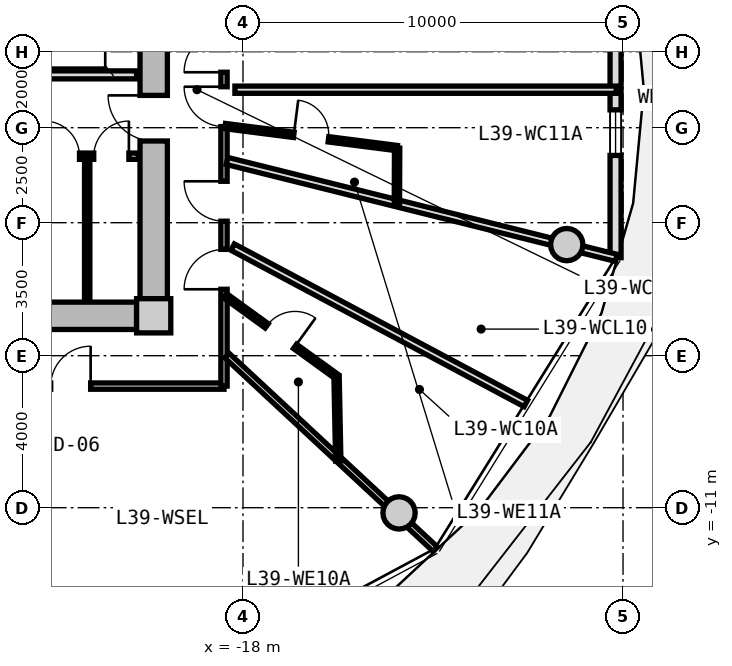
"""IFC4 building model, lengths in metres.
Left out: names, types, materials, properties, quantities, classifications, styles, units other than length and angle.
Written with IfcOpenShell. Run it as: python <this file> out.ifc"""

import sys

from ifc_helpers import new_model, si_unit, direction, frame, frame_2d, origin, origin_2d, place, context, subcontext, project, spatial, rectangle, circle, extrude, source, transform, mapped, element, fill, save


model = new_model("IFC4")
c1 = context("Model", 3, precision=1e-05, world=origin(), true_north=direction((0.0, 1.0)))
c2 = subcontext(c1, "Body", "Model", "MODEL_VIEW")
j1 = project(units=[si_unit("LENGTHUNIT", "METRE"), si_unit("PLANEANGLEUNIT", "RADIAN")], contexts=[c1])
p1 = place(None, origin())
s1 = spatial("IfcSite", under=j1, at=p1, CompositionType="ELEMENT")
p2 = place(p1, origin())
s2 = spatial("IfcBuilding", under=s1, at=p2, CompositionType="ELEMENT")
p3 = place(p2, frame((0.0, 0.0, 126.75)))
s3 = spatial("IfcBuildingStorey", under=s2, at=p3, CompositionType="ELEMENT", Elevation=126.75)
m1 = source(origin(), c2, "Body", "SweptSolid", [
    extrude(rectangle(XDim=0.9, YDim=0.9, at=origin_2d()), origin(), (0.0, 0.0, 1.0), 3.05),
])
p4 = place(p3, frame((-20.35, -5.95, 0.0), z_axis=(0.0, 0.0, 1.0), x_axis=(1.0, 0.0, 0.0)))
e1 = element("IfcColumn", 1, at=p4, inside=s3, PredefinedType="COLUMN", context=c2, shape_type="MappedRepresentation", body=[
    mapped(m1, transform((0.0, 0.0, 0.0), x_axis=(1.0, 0.0, 0.0), y_axis=(0.0, 1.0, 0.0), z_axis=(0.0, 0.0, 1.0), scale=1.0)),
])
m2 = source(origin(), c2, "Body", "SweptSolid", [
    extrude(rectangle(XDim=14.4, YDim=0.72, at=frame_2d((7.2, 0.0))), origin(), (0.0, 0.0, 1.0), 2.73),
])
p5 = place(p3, frame((-20.8, -5.95, 0.0), z_axis=(0.0, 0.0, 1.0), x_axis=(-1.0, 0.0, 0.0)))
e2 = element("IfcWall", 2, at=p5, inside=s3, PredefinedType="SHEAR", context=c2, shape_type="MappedRepresentation", body=[
    mapped(m2, transform((0.0, 0.0, 0.0), x_axis=(1.0, 0.0, 0.0), y_axis=(0.0, 1.0, 0.0), z_axis=(0.0, 0.0, 1.0), scale=1.0)),
])
m3 = source(origin(), c2, "Body", "SweptSolid", [
    extrude(rectangle(XDim=11.0, YDim=0.72, at=frame_2d((5.5, 0.0))), origin(), (0.0, 0.0, 1.0), 2.73),
])
p6 = place(p3, frame((-20.35, 5.5, 0.0), z_axis=(0.0, 0.0, 1.0), x_axis=(0.0, -1.0, 0.0)))
e3 = element("IfcWall", 3, at=p6, inside=s3, PredefinedType="SHEAR", context=c2, shape_type="MappedRepresentation", body=[
    mapped(m3, transform((0.0, 0.0, 0.0), x_axis=(1.0, 0.0, 0.0), y_axis=(0.0, 1.0, 0.0), z_axis=(0.0, 0.0, 1.0), scale=1.0)),
])
p7 = place(p6, frame((5.65, 0.0, 0.0)))
e4 = element("IfcOpeningElement", 4, at=p7, cuts=e3, PredefinedType="OPENING", context=c2, shape_type="SweptSolid", body=[
    extrude(rectangle(XDim=1.2, YDim=2.15, at=frame_2d((0.6, 1.075))), frame((0.0, 0.37, 0.0), z_axis=(0.0, -1.0, 0.0), x_axis=(1.0, 0.0, 0.0)), (0.0, 0.0, 1.0), 0.74),
])
m4 = source(origin(), c2, "Body", "SweptSolid", [
    extrude(circle(Radius=0.425, at=origin_2d()), origin(), (0.0, 0.0, 1.0), 3.05),
])
for number, where, z_axis, x_axis in (
    (5, (-13.894, -11.137, 0.0), (0.0, 0.0, 1.0), (1.0, 0.0, 0.0)),
    (6, (-9.481, -4.076, 0.0), (0.0, 0.0, 1.0), (1.0, 0.0, 0.0)),
):
    element("IfcColumn", number, at=place(p3, frame(where, z_axis=z_axis, x_axis=x_axis)), inside=s3, PredefinedType="COLUMN", context=c2, shape_type="MappedRepresentation", body=[
        mapped(m4, transform((0.0, 0.0, 0.0), x_axis=(1.0, 0.0, 0.0), y_axis=(0.0, 1.0, 0.0), z_axis=(0.0, 0.0, 1.0), scale=1.0)),
    ])
m5 = source(origin(), c2, "Body", "SweptSolid", [
    extrude(rectangle(XDim=8.841, YDim=0.29, at=frame_2d((4.421, 0.0))), origin(), (0.0, 0.0, 1.0), 2.73),
])
p8 = place(p3, frame((-8.196, 4.421, 0.0), z_axis=(0.0, 0.0, 1.0), x_axis=(0.0, -1.0, 0.0)))
e7 = element("IfcWall", 7, at=p8, inside=s3, PredefinedType="SOLIDWALL", context=c2, shape_type="MappedRepresentation", body=[
    mapped(m5, transform((0.0, 0.0, 0.0), x_axis=(1.0, 0.0, 0.0), y_axis=(0.0, 1.0, 0.0), z_axis=(0.0, 0.0, 1.0), scale=1.0)),
])
p9 = place(p8, frame((0.98, 0.0, 0.0)))
e8 = element("IfcOpeningElement", 8, at=p9, cuts=e7, PredefinedType="OPENING", context=c2, shape_type="SweptSolid", body=[
    extrude(rectangle(XDim=1.15, YDim=2.25, at=frame_2d((0.575, 1.125))), frame((0.0, 0.155, 0.0), z_axis=(0.0, -1.0, 0.0), x_axis=(1.0, 0.0, 0.0)), (0.0, 0.0, 1.0), 0.31),
])
p10 = place(p8, frame((4.951, 0.0, 0.85)))
e9 = element("IfcOpeningElement", 9, at=p10, cuts=e7, PredefinedType="OPENING", context=c2, shape_type="SweptSolid", body=[
    extrude(rectangle(XDim=1.2, YDim=1.5, at=frame_2d((0.6, 0.75))), frame((0.0, 0.155, 0.0), z_axis=(0.0, -1.0, 0.0), x_axis=(1.0, 0.0, 0.0)), (0.0, 0.0, 1.0), 0.31),
])
m6 = source(origin(), c2, "Body", "SweptSolid", [
    extrude(rectangle(XDim=6.66, YDim=0.21, at=frame_2d((3.33, 0.0))), origin(), (0.0, 0.0, 1.0), 2.715),
])
p11 = place(p3, frame((-27.46, 0.39, 0.0), z_axis=(0.0, 0.0, 1.0), x_axis=(1.0, 0.0, 0.0)))
e10 = element("IfcWall", 10, at=p11, inside=s3, PredefinedType="PARTITIONING", context=c2, shape_type="MappedRepresentation", body=[
    mapped(m6, transform((0.0, 0.0, 0.0), x_axis=(1.0, 0.0, 0.0), y_axis=(0.0, 1.0, 0.0), z_axis=(0.0, 0.0, 1.0), scale=1.0)),
])
p12 = place(p11, frame((1.0, 0.0, 0.0)))
e11 = element("IfcOpeningElement", 11, at=p12, cuts=e10, PredefinedType="OPENING", context=c2, shape_type="SweptSolid", body=[
    extrude(rectangle(XDim=1.2, YDim=2.15, at=frame_2d((0.6, 1.075))), frame((0.0, 0.115, 0.0), z_axis=(0.0, -1.0, 0.0), x_axis=(1.0, 0.0, 0.0)), (0.0, 0.0, 1.0), 0.23),
])
m7 = source(origin(), c2, "Body", "SweptSolid", [
    extrude(rectangle(XDim=2.7, YDim=0.165, at=frame_2d((1.35, 0.0))), origin(), (0.0, 0.0, 1.0), 2.715),
])
p13 = place(p3, frame((-23.45, -1.75, 0.0), z_axis=(0.0, 0.0, 1.0), x_axis=(1.0, 0.0, 0.0)))
e12 = element("IfcWall", 12, at=p13, inside=s3, PredefinedType="PARTITIONING", context=c2, shape_type="MappedRepresentation", body=[
    mapped(m7, transform((0.0, 0.0, 0.0), x_axis=(1.0, 0.0, 0.0), y_axis=(0.0, 1.0, 0.0), z_axis=(0.0, 0.0, 1.0), scale=1.0)),
])
p14 = place(p13, frame((0.222, 0.0, 0.0)))
e13 = element("IfcOpeningElement", 13, at=p14, cuts=e12, PredefinedType="OPENING", context=c2, shape_type="SweptSolid", body=[
    extrude(rectangle(XDim=0.925, YDim=2.1, at=frame_2d((0.462, 1.05))), frame((0.0, 0.093, 0.0), z_axis=(0.0, -1.0, 0.0), x_axis=(1.0, 0.0, 0.0)), (0.0, 0.0, 1.0), 0.185),
])
p15 = place(p13, frame((1.522, 0.0, 0.0)))
e14 = element("IfcOpeningElement", 14, at=p15, cuts=e12, PredefinedType="OPENING", context=c2, shape_type="SweptSolid", body=[
    extrude(rectangle(XDim=0.925, YDim=2.1, at=frame_2d((0.462, 1.05))), frame((0.0, 0.093, 0.0), z_axis=(0.0, -1.0, 0.0), x_axis=(1.0, 0.0, 0.0)), (0.0, 0.0, 1.0), 0.185),
])
m8 = source(origin(), c2, "Body", "SweptSolid", [
    extrude(rectangle(XDim=3.8, YDim=0.14, at=frame_2d((1.9, 0.0))), origin(), (0.0, 0.0, 1.0), 2.715),
])
p16 = place(p3, frame((-22.1, -5.55, 0.0), z_axis=(0.0, 0.0, 1.0), x_axis=(0.0, 1.0, 0.0)))
e15 = element("IfcWall", 15, at=p16, inside=s3, PredefinedType="PARTITIONING", context=c2, shape_type="MappedRepresentation", body=[
    mapped(m8, transform((0.0, 0.0, 0.0), x_axis=(1.0, 0.0, 0.0), y_axis=(0.0, 1.0, 0.0), z_axis=(0.0, 0.0, 1.0), scale=1.0)),
])
m9 = source(origin(), c2, "Body", "SweptSolid", [
    extrude(rectangle(XDim=8.6, YDim=0.165, at=frame_2d((4.3, 0.0))), origin(), (0.0, 0.0, 1.0), 2.715),
])
p17 = place(p3, frame((-18.5, -7.8, 0.0), z_axis=(0.0, 0.0, 1.0), x_axis=(-1.0, 0.0, 0.0)))
e16 = element("IfcWall", 16, at=p17, inside=s3, PredefinedType="PARTITIONING", context=c2, shape_type="MappedRepresentation", body=[
    mapped(m9, transform((0.0, 0.0, 0.0), x_axis=(1.0, 0.0, 0.0), y_axis=(0.0, 1.0, 0.0), z_axis=(0.0, 0.0, 1.0), scale=1.0)),
])
p18 = place(p17, frame((3.509, 0.0, 0.0)))
e17 = element("IfcOpeningElement", 17, at=p18, cuts=e16, PredefinedType="OPENING", context=c2, shape_type="SweptSolid", body=[
    extrude(rectangle(XDim=1.05, YDim=2.15, at=frame_2d((0.525, 1.075))), frame((0.0, 0.093, 0.0), z_axis=(0.0, -1.0, 0.0), x_axis=(1.0, 0.0, 0.0)), (0.0, 0.0, 1.0), 0.185),
])
m10 = source(origin(), c2, "Body", "SweptSolid", [
    extrude(rectangle(XDim=15.6, YDim=0.165, at=frame_2d((7.8, 0.0))), origin(), (0.0, 0.0, 1.0), 2.715),
])
p19 = place(p3, frame((-18.5, 7.8, 0.0), z_axis=(0.0, 0.0, 1.0), x_axis=(0.0, -1.0, 0.0)))
e18 = element("IfcWall", 18, at=p19, inside=s3, PredefinedType="PARTITIONING", context=c2, shape_type="MappedRepresentation", body=[
    mapped(m10, transform((0.0, 0.0, 0.0), x_axis=(1.0, 0.0, 0.0), y_axis=(0.0, 1.0, 0.0), z_axis=(0.0, 0.0, 1.0), scale=1.0)),
])
p20 = place(p19, frame((12.002, 0.0, 0.0)))
e19 = element("IfcOpeningElement", 19, at=p20, cuts=e18, PredefinedType="OPENING", context=c2, shape_type="SweptSolid", body=[
    extrude(rectangle(XDim=1.05, YDim=2.15, at=frame_2d((0.525, 1.075))), frame((0.0, 0.093, 0.0), z_axis=(0.0, -1.0, 0.0), x_axis=(1.0, 0.0, 0.0)), (0.0, 0.0, 1.0), 0.185),
])
p21 = place(p19, frame((10.211, 0.0, 0.0)))
e20 = element("IfcOpeningElement", 20, at=p21, cuts=e18, PredefinedType="OPENING", context=c2, shape_type="SweptSolid", body=[
    extrude(rectangle(XDim=1.05, YDim=2.15, at=frame_2d((0.525, 1.075))), frame((0.0, 0.093, 0.0), z_axis=(0.0, -1.0, 0.0), x_axis=(1.0, 0.0, 0.0)), (0.0, 0.0, 1.0), 0.185),
])
p22 = place(p19, frame((7.722, 0.0, 0.0)))
e21 = element("IfcOpeningElement", 21, at=p22, cuts=e18, PredefinedType="OPENING", context=c2, shape_type="SweptSolid", body=[
    extrude(rectangle(XDim=1.05, YDim=2.15, at=frame_2d((0.525, 1.075))), frame((0.0, 0.093, 0.0), z_axis=(0.0, -1.0, 0.0), x_axis=(1.0, 0.0, 0.0)), (0.0, 0.0, 1.0), 0.185),
])
p23 = place(p19, frame((6.291, 0.0, 0.0)))
e22 = element("IfcOpeningElement", 22, at=p23, cuts=e18, PredefinedType="OPENING", context=c2, shape_type="SweptSolid", body=[
    extrude(rectangle(XDim=1.05, YDim=2.15, at=frame_2d((0.525, 1.075))), frame((0.0, 0.093, 0.0), z_axis=(0.0, -1.0, 0.0), x_axis=(1.0, 0.0, 0.0)), (0.0, 0.0, 1.0), 0.185),
])
p24 = place(p19, frame((4.296, 0.0, 0.0)))
e23 = element("IfcOpeningElement", 23, at=p24, cuts=e18, PredefinedType="OPENING", context=c2, shape_type="SweptSolid", body=[
    extrude(rectangle(XDim=1.05, YDim=2.15, at=frame_2d((0.525, 1.075))), frame((0.0, 0.093, 0.0), z_axis=(0.0, -1.0, 0.0), x_axis=(1.0, 0.0, 0.0)), (0.0, 0.0, 1.0), 0.185),
])
p25 = place(p19, frame((1.654, 0.0, 0.0)))
e24 = element("IfcOpeningElement", 24, at=p25, cuts=e18, PredefinedType="OPENING", context=c2, shape_type="SweptSolid", body=[
    extrude(rectangle(XDim=1.05, YDim=2.15, at=frame_2d((0.525, 1.075))), frame((0.0, 0.093, 0.0), z_axis=(0.0, -1.0, 0.0), x_axis=(1.0, 0.0, 0.0)), (0.0, 0.0, 1.0), 0.185),
])
m11 = source(origin(), c2, "Body", "SweptSolid", [
    extrude(rectangle(XDim=7.482, YDim=0.165, at=frame_2d((3.741, 0.0))), origin(), (0.0, 0.0, 1.0), 2.215),
])
p26 = place(p3, frame((-18.42, -6.998, 0.0), z_axis=(0.0, 0.0, 1.0), x_axis=(0.732508698043, -0.680757671489, 0.0)))
e25 = element("IfcWall", 25, at=p26, inside=s3, PredefinedType="PARTITIONING", context=c2, shape_type="MappedRepresentation", body=[
    mapped(m11, transform((0.0, 0.0, 0.0), x_axis=(1.0, 0.0, 0.0), y_axis=(0.0, 1.0, 0.0), z_axis=(0.0, 0.0, 1.0), scale=1.0)),
])
m12 = source(origin(), c2, "Body", "SweptSolid", [
    extrude(rectangle(XDim=10.556, YDim=0.19, at=frame_2d((5.278, 0.0))), origin(), (0.0, 0.0, 1.0), 2.215),
])
p27 = place(p3, frame((-18.42, -1.875, 0.0), z_axis=(0.0, 0.0, 1.0), x_axis=(0.970363857851, -0.241648470667, 0.0)))
e26 = element("IfcWall", 26, at=p27, inside=s3, PredefinedType="PARTITIONING", context=c2, shape_type="MappedRepresentation", body=[
    mapped(m12, transform((0.0, 0.0, 0.0), x_axis=(1.0, 0.0, 0.0), y_axis=(0.0, 1.0, 0.0), z_axis=(0.0, 0.0, 1.0), scale=1.0)),
])
m13 = source(origin(), c2, "Body", "SweptSolid", [
    extrude(rectangle(XDim=8.744, YDim=0.19, at=frame_2d((4.372, 0.0))), origin(), (0.0, 0.0, 1.0), 2.715),
])
p28 = place(p3, frame((-18.273, -4.142, 0.0), z_axis=(0.0, 0.0, 1.0), x_axis=(0.882252449936, -0.470776607938, 0.0)))
e27 = element("IfcWall", 27, at=p28, inside=s3, PredefinedType="PARTITIONING", context=c2, shape_type="MappedRepresentation", body=[
    mapped(m13, transform((0.0, 0.0, 0.0), x_axis=(1.0, 0.0, 0.0), y_axis=(0.0, 1.0, 0.0), z_axis=(0.0, 0.0, 1.0), scale=1.0)),
])
m14 = source(origin(), c2, "Body", "SweptSolid", [
    extrude(rectangle(XDim=3.621, YDim=0.14, at=frame_2d((1.811, 0.0))), origin(), (0.0, 0.0, 1.0), 2.715),
])
p29 = place(p3, frame((-18.47, -5.422, 0.0), z_axis=(0.0, 0.0, 1.0), x_axis=(0.80968252222, -0.586868139544, 0.0)))
e28 = element("IfcWall", 28, at=p29, inside=s3, PredefinedType="PARTITIONING", context=c2, shape_type="MappedRepresentation", body=[
    mapped(m14, transform((0.0, 0.0, 0.0), x_axis=(1.0, 0.0, 0.0), y_axis=(0.0, 1.0, 0.0), z_axis=(0.0, 0.0, 1.0), scale=1.0)),
])
p30 = place(p29, frame((1.351, 0.0, 0.0)))
e29 = element("IfcOpeningElement", 29, at=p30, cuts=e28, PredefinedType="OPENING", context=c2, shape_type="SweptSolid", body=[
    extrude(rectangle(XDim=0.92, YDim=2.1, at=frame_2d((0.46, 1.05))), frame((0.0, 0.08, 0.0), z_axis=(0.0, -1.0, 0.0), x_axis=(1.0, 0.0, 0.0)), (0.0, 0.0, 1.0), 0.16),
])
m15 = source(origin(), c2, "Body", "SweptSolid", [
    extrude(rectangle(XDim=2.225, YDim=0.14, at=frame_2d((1.112, 0.0))), origin(), (0.0, 0.0, 1.0), 2.715),
])
p31 = place(p3, frame((-15.538, -7.547, 0.0), z_axis=(0.0, 0.0, 1.0), x_axis=(0.019971869027, -0.999800542332, 0.0)))
e30 = element("IfcWall", 30, at=p31, inside=s3, PredefinedType="PARTITIONING", context=c2, shape_type="MappedRepresentation", body=[
    mapped(m15, transform((0.0, 0.0, 0.0), x_axis=(1.0, 0.0, 0.0), y_axis=(0.0, 1.0, 0.0), z_axis=(0.0, 0.0, 1.0), scale=1.0)),
])
m16 = source(origin(), c2, "Body", "SweptSolid", [
    extrude(rectangle(XDim=10.036, YDim=0.19, at=frame_2d((5.018, 0.0))), origin(), (0.0, 0.0, 1.0), 2.715),
])
p32 = place(p3, frame((-18.213, 0.0, 0.0), z_axis=(0.0, 0.0, 1.0), x_axis=(1.0, 0.0, 0.0)))
e31 = element("IfcWall", 31, at=p32, inside=s3, PredefinedType="PARTITIONING", context=c2, shape_type="MappedRepresentation", body=[
    mapped(m16, transform((0.0, 0.0, 0.0), x_axis=(1.0, 0.0, 0.0), y_axis=(0.0, 1.0, 0.0), z_axis=(0.0, 0.0, 1.0), scale=1.0)),
])
m17 = source(origin(), c2, "Body", "SweptSolid", [
    extrude(rectangle(XDim=4.562, YDim=0.14, at=frame_2d((2.281, 0.0))), origin(), (0.0, 0.0, 1.0), 2.715),
])
p33 = place(p3, frame((-18.47, -0.958, 0.0), z_axis=(0.0, 0.0, 1.0), x_axis=(0.991904666356, -0.126984774129, 0.0)))
e32 = element("IfcWall", 32, at=p33, inside=s3, PredefinedType="PARTITIONING", context=c2, shape_type="MappedRepresentation", body=[
    mapped(m17, transform((0.0, 0.0, 0.0), x_axis=(1.0, 0.0, 0.0), y_axis=(0.0, 1.0, 0.0), z_axis=(0.0, 0.0, 1.0), scale=1.0)),
])
p34 = place(p33, frame((1.821, 0.0, 0.0)))
e33 = element("IfcOpeningElement", 33, at=p34, cuts=e32, PredefinedType="OPENING", context=c2, shape_type="SweptSolid", body=[
    extrude(rectangle(XDim=0.92, YDim=2.1, at=frame_2d((0.46, 1.05))), frame((0.0, 0.08, 0.0), z_axis=(0.0, -1.0, 0.0), x_axis=(1.0, 0.0, 0.0)), (0.0, 0.0, 1.0), 0.16),
])
m18 = source(origin(), c2, "Body", "SweptSolid", [
    extrude(rectangle(XDim=1.468, YDim=0.14, at=frame_2d((0.734, 0.0))), origin(), (0.0, 0.0, 1.0), 2.715),
])
p35 = place(p3, frame((-13.945, -1.537, 0.0), z_axis=(0.0, 0.0, 1.0), x_axis=(-0.00399198416, -0.999992031999, 0.0)))
e34 = element("IfcWall", 34, at=p35, inside=s3, PredefinedType="PARTITIONING", context=c2, shape_type="MappedRepresentation", body=[
    mapped(m18, transform((0.0, 0.0, 0.0), x_axis=(1.0, 0.0, 0.0), y_axis=(0.0, 1.0, 0.0), z_axis=(0.0, 0.0, 1.0), scale=1.0)),
])
m19 = source(origin(), c2, "Body", "SweptSolid", [
    extrude(rectangle(XDim=1.2, YDim=1.5, at=frame_2d((0.6, 0.75))), frame((0.0, 0.03, 0.0), z_axis=(0.0, -1.0, 0.0), x_axis=(1.0, 0.0, 0.0)), (0.0, 0.0, 1.0), 0.06),
])
p36 = place(p10, origin())
e35 = element("IfcWindow", 35, at=p36, inside=s3, PartitioningType="SINGLE_PANEL", PredefinedType="WINDOW", context=c2, shape_type="MappedRepresentation", body=[
    mapped(m19, transform((0.0, 0.0, 0.0), x_axis=(1.0, 0.0, 0.0), y_axis=(0.0, 1.0, 0.0), z_axis=(0.0, 0.0, 1.0), scale=1.0)),
])
fill(e9, e35)
m20 = source(origin(), c2, "Body", "SweptSolid", [
    extrude(rectangle(XDim=1.2, YDim=2.15, at=frame_2d((0.6, 1.075))), frame((0.0, 0.025, 0.0), z_axis=(0.0, -1.0, 0.0), x_axis=(1.0, 0.0, 0.0)), (0.0, 0.0, 1.0), 0.05),
])
p37 = place(p7, frame((1.2, 0.0, 0.0), z_axis=(0.0, 0.0, 1.0), x_axis=(-1.0, 0.0, 0.0)))
e36 = element("IfcDoor", 36, at=p37, inside=s3, OperationType="SINGLE_SWING_RIGHT", PredefinedType="DOOR", context=c2, shape_type="MappedRepresentation", body=[
    mapped(m20, transform((0.0, 0.0, 0.0), x_axis=(1.0, 0.0, 0.0), y_axis=(0.0, 1.0, 0.0), z_axis=(0.0, 0.0, 1.0), scale=1.0)),
])
fill(e4, e36)
m21 = source(origin(), c2, "Body", "SweptSolid", [
    extrude(rectangle(XDim=0.925, YDim=2.1, at=frame_2d((0.462, 1.05))), frame((0.0, 0.025, 0.0), z_axis=(0.0, -1.0, 0.0), x_axis=(1.0, 0.0, 0.0)), (0.0, 0.0, 1.0), 0.05),
])
p38 = place(p14, origin())
e37 = element("IfcDoor", 37, at=p38, inside=s3, OperationType="SINGLE_SWING_LEFT", PredefinedType="DOOR", context=c2, shape_type="MappedRepresentation", body=[
    mapped(m21, transform((0.0, 0.0, 0.0), x_axis=(1.0, 0.0, 0.0), y_axis=(0.0, 1.0, 0.0), z_axis=(0.0, 0.0, 1.0), scale=1.0)),
])
fill(e13, e37)
p39 = place(p15, origin())
e38 = element("IfcDoor", 38, at=p39, inside=s3, OperationType="SINGLE_SWING_RIGHT", PredefinedType="DOOR", context=c2, shape_type="MappedRepresentation", body=[
    mapped(m21, transform((0.0, 0.0, 0.0), x_axis=(1.0, 0.0, 0.0), y_axis=(0.0, 1.0, 0.0), z_axis=(0.0, 0.0, 1.0), scale=1.0)),
])
fill(e14, e38)
m22 = source(origin(), c2, "Body", "SweptSolid", [
    extrude(rectangle(XDim=1.05, YDim=2.15, at=frame_2d((0.525, 1.075))), frame((0.0, 0.025, 0.0), z_axis=(0.0, -1.0, 0.0), x_axis=(1.0, 0.0, 0.0)), (0.0, 0.0, 1.0), 0.05),
])
p40 = place(p18, frame((1.05, 0.0, 0.0), z_axis=(0.0, 0.0, 1.0), x_axis=(-1.0, 0.0, 0.0)))
e39 = element("IfcDoor", 39, at=p40, inside=s3, OperationType="SINGLE_SWING_RIGHT", PredefinedType="DOOR", context=c2, shape_type="MappedRepresentation", body=[
    mapped(m22, transform((0.0, 0.0, 0.0), x_axis=(1.0, 0.0, 0.0), y_axis=(0.0, 1.0, 0.0), z_axis=(0.0, 0.0, 1.0), scale=1.0)),
])
fill(e17, e39)
p41 = place(p20, frame((1.05, 0.0, 0.0), z_axis=(0.0, 0.0, 1.0), x_axis=(-1.0, 0.0, 0.0)))
e40 = element("IfcDoor", 40, at=p41, inside=s3, OperationType="SINGLE_SWING_LEFT", PredefinedType="DOOR", context=c2, shape_type="MappedRepresentation", body=[
    mapped(m22, transform((0.0, 0.0, 0.0), x_axis=(1.0, 0.0, 0.0), y_axis=(0.0, 1.0, 0.0), z_axis=(0.0, 0.0, 1.0), scale=1.0)),
])
fill(e19, e40)
m23 = source(origin(), c2, "Body", "SweptSolid", [
    extrude(rectangle(XDim=0.92, YDim=2.1, at=frame_2d((0.46, 1.05))), frame((0.0, 0.025, 0.0), z_axis=(0.0, -1.0, 0.0), x_axis=(1.0, 0.0, 0.0)), (0.0, 0.0, 1.0), 0.05),
])
p42 = place(p30, origin())
e41 = element("IfcDoor", 41, at=p42, inside=s3, OperationType="SINGLE_SWING_RIGHT", PredefinedType="DOOR", context=c2, shape_type="MappedRepresentation", body=[
    mapped(m23, transform((0.0, 0.0, 0.0), x_axis=(1.0, 0.0, 0.0), y_axis=(0.0, 1.0, 0.0), z_axis=(0.0, 0.0, 1.0), scale=1.0)),
])
fill(e29, e41)
p43 = place(p21, frame((1.05, 0.0, 0.0), z_axis=(0.0, 0.0, 1.0), x_axis=(-1.0, 0.0, 0.0)))
e42 = element("IfcDoor", 42, at=p43, inside=s3, OperationType="SINGLE_SWING_RIGHT", PredefinedType="DOOR", context=c2, shape_type="MappedRepresentation", body=[
    mapped(m22, transform((0.0, 0.0, 0.0), x_axis=(1.0, 0.0, 0.0), y_axis=(0.0, 1.0, 0.0), z_axis=(0.0, 0.0, 1.0), scale=1.0)),
])
fill(e20, e42)
p44 = place(p22, frame((1.05, 0.0, 0.0), z_axis=(0.0, 0.0, 1.0), x_axis=(-1.0, 0.0, 0.0)))
e43 = element("IfcDoor", 43, at=p44, inside=s3, OperationType="SINGLE_SWING_RIGHT", PredefinedType="DOOR", context=c2, shape_type="MappedRepresentation", body=[
    mapped(m22, transform((0.0, 0.0, 0.0), x_axis=(1.0, 0.0, 0.0), y_axis=(0.0, 1.0, 0.0), z_axis=(0.0, 0.0, 1.0), scale=1.0)),
])
fill(e21, e43)
p45 = place(p34, origin())
e44 = element("IfcDoor", 44, at=p45, inside=s3, OperationType="SINGLE_SWING_LEFT", PredefinedType="DOOR", context=c2, shape_type="MappedRepresentation", body=[
    mapped(m23, transform((0.0, 0.0, 0.0), x_axis=(1.0, 0.0, 0.0), y_axis=(0.0, 1.0, 0.0), z_axis=(0.0, 0.0, 1.0), scale=1.0)),
])
fill(e33, e44)
p46 = place(p23, frame((1.05, 0.0, 0.0), z_axis=(0.0, 0.0, 1.0), x_axis=(-1.0, 0.0, 0.0)))
e45 = element("IfcDoor", 45, at=p46, inside=s3, OperationType="SINGLE_SWING_LEFT", PredefinedType="DOOR", context=c2, shape_type="MappedRepresentation", body=[
    mapped(m22, transform((0.0, 0.0, 0.0), x_axis=(1.0, 0.0, 0.0), y_axis=(0.0, 1.0, 0.0), z_axis=(0.0, 0.0, 1.0), scale=1.0)),
])
fill(e22, e45)
save(model, sys.argv[1])
